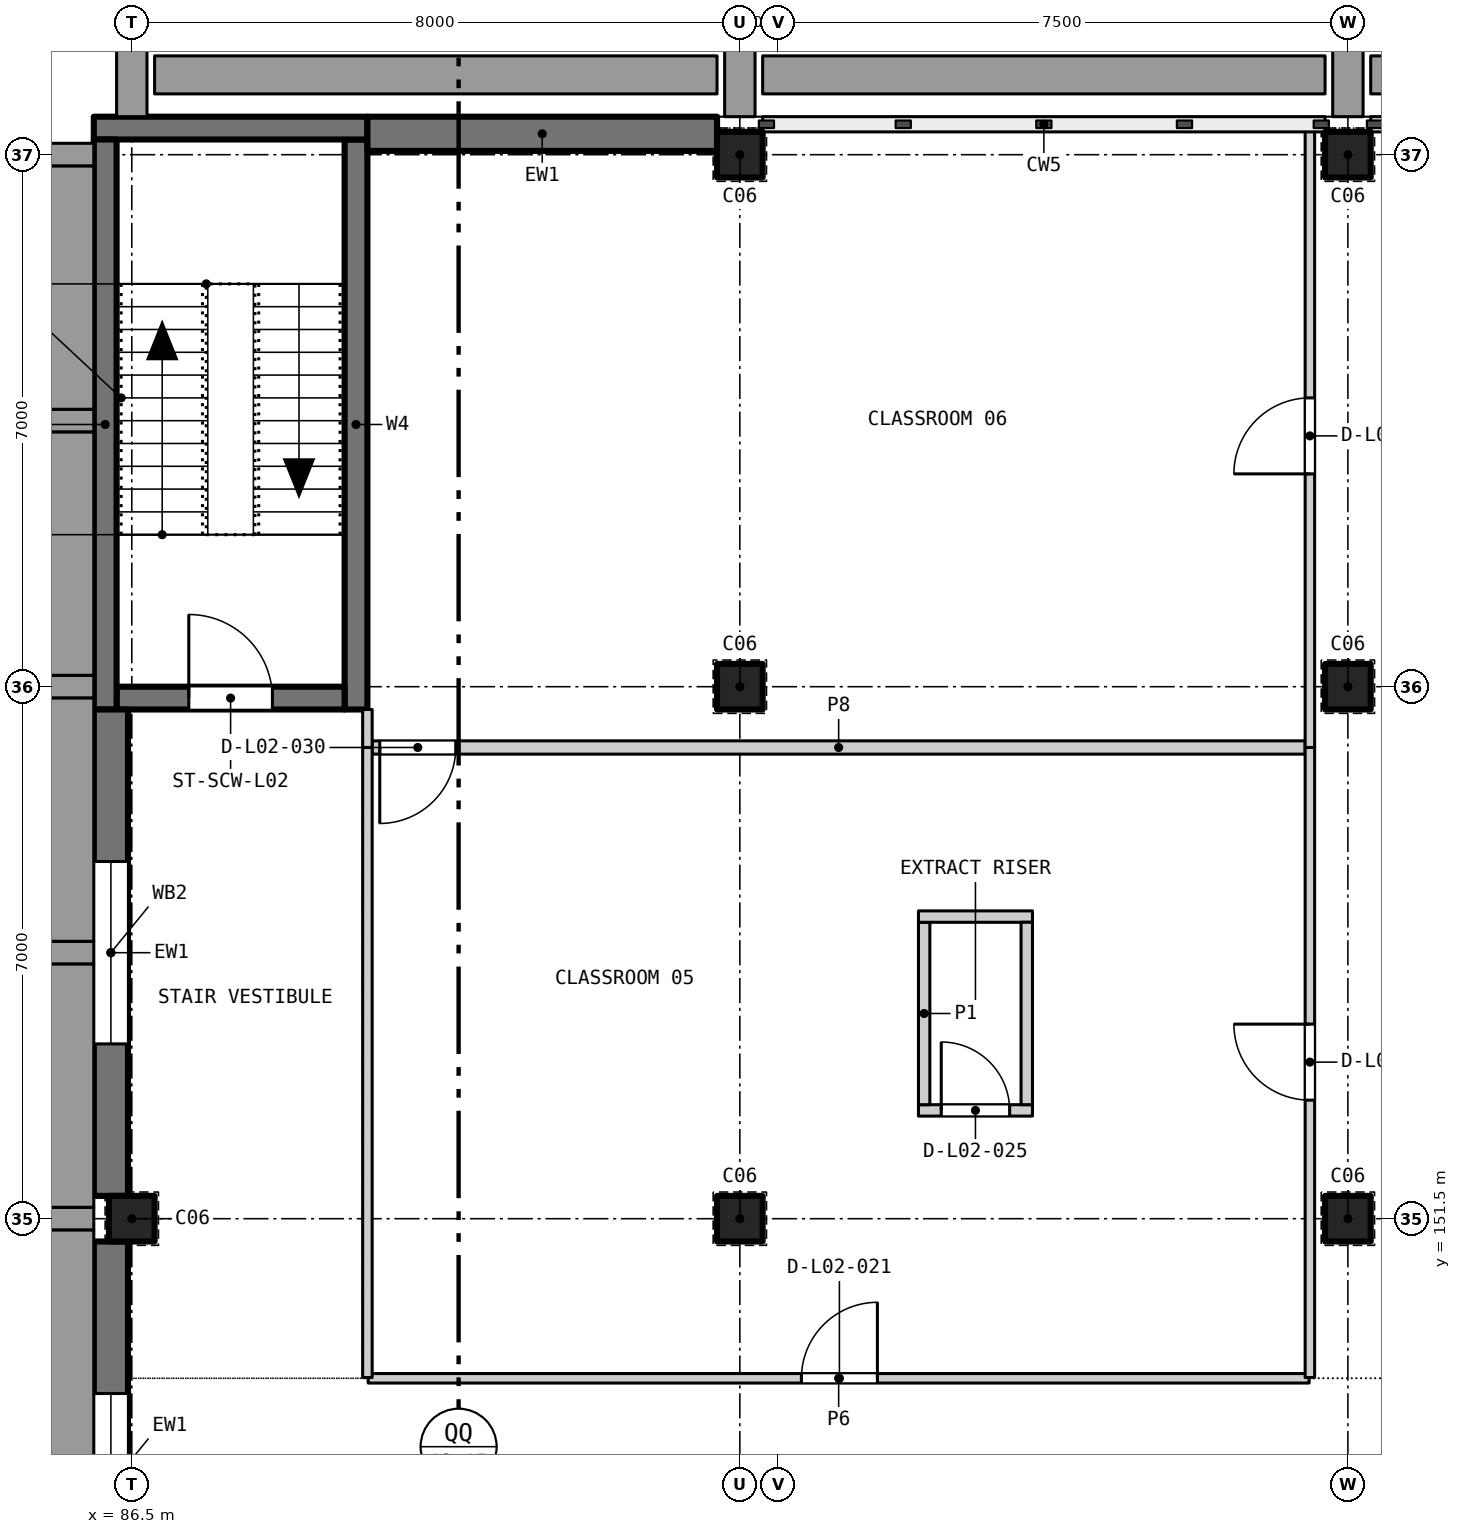
"""IFC4 building model, lengths in metres.
Left out: names, types, materials, properties, quantities, classifications, styles, units other than length and angle.
Written with IfcOpenShell. Run it as: python <this file> out.ifc"""

import sys

from ifc_helpers import new_model, si_unit, direction, frame, frame_2d, origin, origin_2d, place, context, subcontext, project, spatial, rectangle, extrude, element, fill, save


model = new_model("IFC4")
c1 = context("Model", 3, precision=1e-05, world=origin(), true_north=direction((0.0, 1.0)))
c2 = subcontext(c1, "Body", "Model", "MODEL_VIEW")
j1 = project(units=[si_unit("LENGTHUNIT", "METRE"), si_unit("PLANEANGLEUNIT", "RADIAN")], contexts=[c1])
p1 = place(None, origin())
s1 = spatial("IfcSite", under=j1, at=p1, CompositionType="ELEMENT")
p2 = place(p1, origin())
s2 = spatial("IfcBuilding", under=s1, at=p2, CompositionType="ELEMENT")
p3 = place(p2, frame((0.0, 0.0, 10.2)))
s3 = spatial("IfcBuildingStorey", under=s2, at=p3, CompositionType="ELEMENT", Elevation=10.2)
for number, where, z_axis, x_axis in (
    (1, (86.5, 151.5, 0.0), (0.0, 0.0, 1.0), (1.0, 0.0, 0.0)),
    (2, (94.5, 151.5, 0.0), (0.0, 0.0, 1.0), (1.0, 0.0, 0.0)),
    (3, (94.5, 158.5, 0.0), (0.0, 0.0, 1.0), (1.0, 0.0, 0.0)),
    (4, (94.5, 165.5, 0.0), (0.0, 0.0, 1.0), (1.0, 0.0, 0.0)),
    (5, (102.5, 151.5, 0.0), (0.0, 0.0, 1.0), (1.0, 0.0, 0.0)),
    (6, (102.5, 158.5, 0.0), (0.0, 0.0, 1.0), (1.0, 0.0, 0.0)),
    (7, (102.5, 165.5, 0.0), (0.0, 0.0, 1.0), (1.0, 0.0, 0.0)),
):
    element("IfcColumn", number, at=place(p3, frame(where, z_axis=z_axis, x_axis=x_axis)), inside=s3, PredefinedType="COLUMN", context=c2, shape_type="SweptSolid", body=[
        extrude(rectangle(XDim=0.6, YDim=0.6, at=origin_2d()), origin(), (0.0, 0.0, 1.0), 4.2),
    ])
p4 = place(p3, frame((89.45, 158.2, 0.0), z_axis=(0.0, 0.0, 1.0), x_axis=(0.0, 1.0, 0.0)))
e8 = element("IfcWall", 8, at=p4, inside=s3, PredefinedType="SHEAR", context=c2, shape_type="SweptSolid", body=[
    extrude(rectangle(XDim=7.5, YDim=0.3, at=frame_2d((3.75, 0.0))), origin(), (0.0, 0.0, 1.0), 4.2),
])
p5 = place(p3, frame((86.3, 158.35, 0.0), z_axis=(0.0, 0.0, 1.0), x_axis=(1.0, 0.0, 0.0)))
e9 = element("IfcWall", 9, at=p5, inside=s3, PredefinedType="SHEAR", context=c2, shape_type="SweptSolid", body=[
    extrude(rectangle(XDim=3.0, YDim=0.3, at=frame_2d((1.5, 0.0))), origin(), (0.0, 0.0, 1.0), 4.2),
])
p6 = place(p5, frame((0.95, 0.0, 0.0)))
e10 = element("IfcOpeningElement", 10, at=p6, cuts=e9, PredefinedType="OPENING", context=c2, shape_type="SweptSolid", body=[
    extrude(rectangle(XDim=1.1, YDim=2.1, at=frame_2d((0.55, 1.05))), frame((0.0, 0.16, 0.0), z_axis=(0.0, -1.0, 0.0), x_axis=(1.0, 0.0, 0.0)), (0.0, 0.0, 1.0), 0.32),
])
p7 = place(p3, frame((86.0, 165.85, 0.0), z_axis=(0.0, 0.0, 1.0), x_axis=(1.0, 0.0, 0.0)))
e11 = element("IfcWall", 11, at=p7, inside=s3, PredefinedType="SOLIDWALL", context=c2, shape_type="SweptSolid", body=[
    extrude(rectangle(XDim=3.6, YDim=0.3, at=frame_2d((1.8, 0.0))), origin(), (0.0, 0.0, 1.0), 3.9),
])
p8 = place(p3, frame((89.6, 165.775, 0.0), z_axis=(0.0, 0.0, 1.0), x_axis=(1.0, 0.0, 0.0)))
e12 = element("IfcWall", 12, at=p8, inside=s3, PredefinedType="SOLIDWALL", context=c2, shape_type="SweptSolid", body=[
    extrude(rectangle(XDim=4.6, YDim=0.45, at=frame_2d((2.3, 0.0))), origin(), (0.0, 0.0, 1.0), 3.1),
])
p9 = place(p3, frame((86.15, 158.2, 0.0), z_axis=(0.0, 0.0, 1.0), x_axis=(0.0, 1.0, 0.0)))
e13 = element("IfcWall", 13, at=p9, inside=s3, PredefinedType="SOLIDWALL", context=c2, shape_type="SweptSolid", body=[
    extrude(rectangle(XDim=7.5, YDim=0.3, at=frame_2d((3.75, 0.0))), origin(), (0.0, 0.0, 1.0), 3.9),
])
p10 = place(p3, frame((86.225, 144.8, 0.0), z_axis=(0.0, 0.0, 1.0), x_axis=(0.0, 1.0, 0.0)))
e14 = element("IfcWall", 14, at=p10, inside=s3, PredefinedType="SOLIDWALL", context=c2, shape_type="SweptSolid", body=[
    extrude(rectangle(XDim=6.4, YDim=0.45, at=frame_2d((3.2, 0.0))), origin(), (0.0, 0.0, 1.0), 3.2),
])
p11 = place(p10, frame((2.0, 0.0, 0.9)))
e15 = element("IfcOpeningElement", 15, at=p11, cuts=e14, PredefinedType="OPENING", context=c2, shape_type="SweptSolid", body=[
    extrude(rectangle(XDim=2.4, YDim=1.6, at=frame_2d((1.2, 0.8))), frame((0.0, 0.235, 0.0), z_axis=(0.0, -1.0, 0.0), x_axis=(1.0, 0.0, 0.0)), (0.0, 0.0, 1.0), 0.47),
])
p12 = place(p3, frame((86.225, 151.8, 0.0), z_axis=(0.0, 0.0, 1.0), x_axis=(0.0, 1.0, 0.0)))
e16 = element("IfcWall", 16, at=p12, inside=s3, PredefinedType="SOLIDWALL", context=c2, shape_type="SweptSolid", body=[
    extrude(rectangle(XDim=6.4, YDim=0.45, at=frame_2d((3.2, 0.0))), origin(), (0.0, 0.0, 1.0), 3.2),
])
p13 = place(p12, frame((2.0, 0.0, 0.9)))
e17 = element("IfcOpeningElement", 17, at=p13, cuts=e16, PredefinedType="OPENING", context=c2, shape_type="SweptSolid", body=[
    extrude(rectangle(XDim=2.4, YDim=1.6, at=frame_2d((1.2, 0.8))), frame((0.0, 0.235, 0.0), z_axis=(0.0, -1.0, 0.0), x_axis=(1.0, 0.0, 0.0)), (0.0, 0.0, 1.0), 0.47),
])
p14 = place(p3, frame((96.85, 152.925, 0.0), z_axis=(0.0, 0.0, 1.0), x_axis=(1.0, 0.0, 0.0)))
e18 = element("IfcWall", 18, at=p14, inside=s3, PredefinedType="PARTITIONING", context=c2, shape_type="SweptSolid", body=[
    extrude(rectangle(XDim=1.5, YDim=0.15, at=frame_2d((0.75, 0.0))), origin(), (0.0, 0.0, 1.0), 3.9),
])
p15 = place(p14, frame((0.3, 0.0, 0.0)))
e19 = element("IfcOpeningElement", 19, at=p15, cuts=e18, PredefinedType="OPENING", context=c2, shape_type="SweptSolid", body=[
    extrude(rectangle(XDim=0.9, YDim=2.1, at=frame_2d((0.45, 1.05))), frame((0.0, 0.085, 0.0), z_axis=(0.0, -1.0, 0.0), x_axis=(1.0, 0.0, 0.0)), (0.0, 0.0, 1.0), 0.17),
])
p16 = place(p3, frame((96.925, 153.0, 0.0), z_axis=(0.0, 0.0, 1.0), x_axis=(0.0, 1.0, 0.0)))
e20 = element("IfcWall", 20, at=p16, inside=s3, PredefinedType="PARTITIONING", context=c2, shape_type="SweptSolid", body=[
    extrude(rectangle(XDim=2.4, YDim=0.15, at=frame_2d((1.2, 0.0))), origin(), (0.0, 0.0, 1.0), 3.9),
])
p17 = place(p3, frame((96.85, 155.475, 0.0), z_axis=(0.0, 0.0, 1.0), x_axis=(1.0, 0.0, 0.0)))
e21 = element("IfcWall", 21, at=p17, inside=s3, PredefinedType="PARTITIONING", context=c2, shape_type="SweptSolid", body=[
    extrude(rectangle(XDim=1.5, YDim=0.15, at=frame_2d((0.75, 0.0))), origin(), (0.0, 0.0, 1.0), 3.9),
])
p18 = place(p3, frame((98.275, 153.0, 0.0), z_axis=(0.0, 0.0, 1.0), x_axis=(0.0, 1.0, 0.0)))
e22 = element("IfcWall", 22, at=p18, inside=s3, PredefinedType="PARTITIONING", context=c2, shape_type="SweptSolid", body=[
    extrude(rectangle(XDim=2.4, YDim=0.15, at=frame_2d((1.2, 0.0))), origin(), (0.0, 0.0, 1.0), 3.9),
])
p19 = place(p3, frame((89.61, 149.4, 0.0), z_axis=(0.0, 0.0, 1.0), x_axis=(1.0, 0.0, 0.0)))
e23 = element("IfcWall", 23, at=p19, inside=s3, PredefinedType="PARTITIONING", context=c2, shape_type="SweptSolid", body=[
    extrude(rectangle(XDim=12.38, YDim=0.125, at=frame_2d((6.19, 0.0))), origin(), (0.0, 0.0, 1.0), 3.9),
])
p20 = place(p19, frame((5.7, 0.0, 0.0)))
e24 = element("IfcOpeningElement", 24, at=p20, cuts=e23, PredefinedType="OPENING", context=c2, shape_type="SweptSolid", body=[
    extrude(rectangle(XDim=1.0, YDim=2.1, at=frame_2d((0.5, 1.05))), frame((0.0, 0.073, 0.0), z_axis=(0.0, -1.0, 0.0), x_axis=(1.0, 0.0, 0.0)), (0.0, 0.0, 1.0), 0.145),
])
p21 = place(p3, frame((89.663, 157.7, 0.0), z_axis=(0.0, 0.0, 1.0), x_axis=(1.0, 0.0, 0.0)))
e25 = element("IfcWall", 25, at=p21, inside=s3, PredefinedType="PARTITIONING", context=c2, shape_type="SweptSolid", body=[
    extrude(rectangle(XDim=12.275, YDim=0.175, at=frame_2d((6.137, 0.0))), origin(), (0.0, 0.0, 1.0), 3.9),
])
p22 = place(p21, frame((0.1, 0.0, 0.0)))
e26 = element("IfcOpeningElement", 26, at=p22, cuts=e25, PredefinedType="OPENING", context=c2, shape_type="SweptSolid", body=[
    extrude(rectangle(XDim=1.0, YDim=2.1, at=frame_2d((0.5, 1.05))), frame((0.0, 0.097, 0.0), z_axis=(0.0, -1.0, 0.0), x_axis=(1.0, 0.0, 0.0)), (0.0, 0.0, 1.0), 0.195),
])
p23 = place(p3, frame((89.6, 149.41, 0.0), z_axis=(0.0, 0.0, 1.0), x_axis=(0.0, 1.0, 0.0)))
e27 = element("IfcWall", 27, at=p23, inside=s3, PredefinedType="PARTITIONING", context=c2, shape_type="SweptSolid", body=[
    extrude(rectangle(XDim=8.29, YDim=0.125, at=frame_2d((4.145, 0.0))), origin(), (0.0, 0.0, 1.0), 3.9),
])
p24 = place(p3, frame((89.6, 157.7, 0.0), z_axis=(0.0, 0.0, 1.0), x_axis=(0.0, 1.0, 0.0)))
e28 = element("IfcWall", 28, at=p24, inside=s3, PredefinedType="PARTITIONING", context=c2, shape_type="SweptSolid", body=[
    extrude(rectangle(XDim=0.5, YDim=0.125, at=frame_2d((0.25, 0.0))), origin(), (0.0, 0.0, 1.0), 3.9),
])
p25 = place(p3, frame((102.0, 149.41, 0.0), z_axis=(0.0, 0.0, 1.0), x_axis=(0.0, 1.0, 0.0)))
e29 = element("IfcWall", 29, at=p25, inside=s3, PredefinedType="PARTITIONING", context=c2, shape_type="SweptSolid", body=[
    extrude(rectangle(XDim=8.29, YDim=0.125, at=frame_2d((4.145, 0.0))), origin(), (0.0, 0.0, 1.0), 3.9),
])
p26 = place(p25, frame((3.65, 0.0, 0.0)))
e30 = element("IfcOpeningElement", 30, at=p26, cuts=e29, PredefinedType="OPENING", context=c2, shape_type="SweptSolid", body=[
    extrude(rectangle(XDim=1.0, YDim=2.1, at=frame_2d((0.5, 1.05))), frame((0.0, 0.073, 0.0), z_axis=(0.0, -1.0, 0.0), x_axis=(1.0, 0.0, 0.0)), (0.0, 0.0, 1.0), 0.145),
])
p27 = place(p3, frame((102.0, 157.7, 0.0), z_axis=(0.0, 0.0, 1.0), x_axis=(0.0, 1.0, 0.0)))
e31 = element("IfcWall", 31, at=p27, inside=s3, PredefinedType="PARTITIONING", context=c2, shape_type="SweptSolid", body=[
    extrude(rectangle(XDim=8.15, YDim=0.125, at=frame_2d((4.075, 0.0))), origin(), (0.0, 0.0, 1.0), 3.9),
])
p28 = place(p27, frame((3.6, 0.0, 0.0)))
e32 = element("IfcOpeningElement", 32, at=p28, cuts=e31, PredefinedType="OPENING", context=c2, shape_type="SweptSolid", body=[
    extrude(rectangle(XDim=1.0, YDim=2.1, at=frame_2d((0.5, 1.05))), frame((0.0, 0.073, 0.0), z_axis=(0.0, -1.0, 0.0), x_axis=(1.0, 0.0, 0.0)), (0.0, 0.0, 1.0), 0.145),
])
p29 = place(p11, origin())
e33 = element("IfcWindow", 33, at=p29, inside=s3, PartitioningType="SINGLE_PANEL", PredefinedType="WINDOW", context=c2, shape_type="SweptSolid", body=[
    extrude(rectangle(XDim=2.4, YDim=1.6, at=frame_2d((1.2, 0.8))), frame((0.0, -0.125, 0.0), z_axis=(0.0, -1.0, 0.0), x_axis=(1.0, 0.0, 0.0)), (0.0, 0.0, 1.0), 0.06),
])
fill(e15, e33)
p30 = place(p13, origin())
e34 = element("IfcWindow", 34, at=p30, inside=s3, PartitioningType="SINGLE_PANEL", PredefinedType="WINDOW", context=c2, shape_type="SweptSolid", body=[
    extrude(rectangle(XDim=2.4, YDim=1.6, at=frame_2d((1.2, 0.8))), frame((0.0, -0.125, 0.0), z_axis=(0.0, -1.0, 0.0), x_axis=(1.0, 0.0, 0.0)), (0.0, 0.0, 1.0), 0.06),
])
fill(e17, e34)
p31 = place(p20, origin())
e35 = element("IfcDoor", 35, at=p31, inside=s3, OperationType="SINGLE_SWING_RIGHT", PredefinedType="DOOR", context=c2, shape_type="SweptSolid", body=[
    extrude(rectangle(XDim=1.0, YDim=2.1, at=frame_2d((0.5, 1.05))), frame((0.0, 0.025, 0.0), z_axis=(0.0, -1.0, 0.0), x_axis=(1.0, 0.0, 0.0)), (0.0, 0.0, 1.0), 0.05),
])
fill(e24, e35)
p32 = place(p15, origin())
e36 = element("IfcDoor", 36, at=p32, inside=s3, OperationType="SINGLE_SWING_LEFT", PredefinedType="DOOR", context=c2, shape_type="SweptSolid", body=[
    extrude(rectangle(XDim=0.9, YDim=2.1, at=frame_2d((0.45, 1.05))), frame((0.0, 0.025, 0.0), z_axis=(0.0, -1.0, 0.0), x_axis=(1.0, 0.0, 0.0)), (0.0, 0.0, 1.0), 0.05),
])
fill(e19, e36)
p33 = place(p26, origin())
e37 = element("IfcDoor", 37, at=p33, inside=s3, OperationType="SINGLE_SWING_RIGHT", PredefinedType="DOOR", context=c2, shape_type="SweptSolid", body=[
    extrude(rectangle(XDim=1.0, YDim=2.1, at=frame_2d((0.5, 1.05))), frame((0.0, 0.025, 0.0), z_axis=(0.0, -1.0, 0.0), x_axis=(1.0, 0.0, 0.0)), (0.0, 0.0, 1.0), 0.05),
])
fill(e30, e37)
p34 = place(p22, frame((1.0, 0.0, 0.0), z_axis=(0.0, 0.0, 1.0), x_axis=(-1.0, 0.0, 0.0)))
e38 = element("IfcDoor", 38, at=p34, inside=s3, OperationType="SINGLE_SWING_RIGHT", PredefinedType="DOOR", context=c2, shape_type="SweptSolid", body=[
    extrude(rectangle(XDim=1.0, YDim=2.1, at=frame_2d((0.5, 1.05))), frame((0.0, 0.025, 0.0), z_axis=(0.0, -1.0, 0.0), x_axis=(1.0, 0.0, 0.0)), (0.0, 0.0, 1.0), 0.05),
])
fill(e26, e38)
p35 = place(p28, origin())
e39 = element("IfcDoor", 39, at=p35, inside=s3, OperationType="SINGLE_SWING_LEFT", PredefinedType="DOOR", context=c2, shape_type="SweptSolid", body=[
    extrude(rectangle(XDim=1.0, YDim=2.1, at=frame_2d((0.5, 1.05))), frame((0.0, 0.025, 0.0), z_axis=(0.0, -1.0, 0.0), x_axis=(1.0, 0.0, 0.0)), (0.0, 0.0, 1.0), 0.05),
])
fill(e32, e39)
p36 = place(p6, origin())
e40 = element("IfcDoor", 40, at=p36, inside=s3, OperationType="SINGLE_SWING_LEFT", PredefinedType="DOOR", context=c2, shape_type="SweptSolid", body=[
    extrude(rectangle(XDim=1.1, YDim=2.1, at=frame_2d((0.55, 1.05))), frame((0.0, 0.025, 0.0), z_axis=(0.0, -1.0, 0.0), x_axis=(1.0, 0.0, 0.0)), (0.0, 0.0, 1.0), 0.05),
])
fill(e10, e40)
save(model, sys.argv[1])
